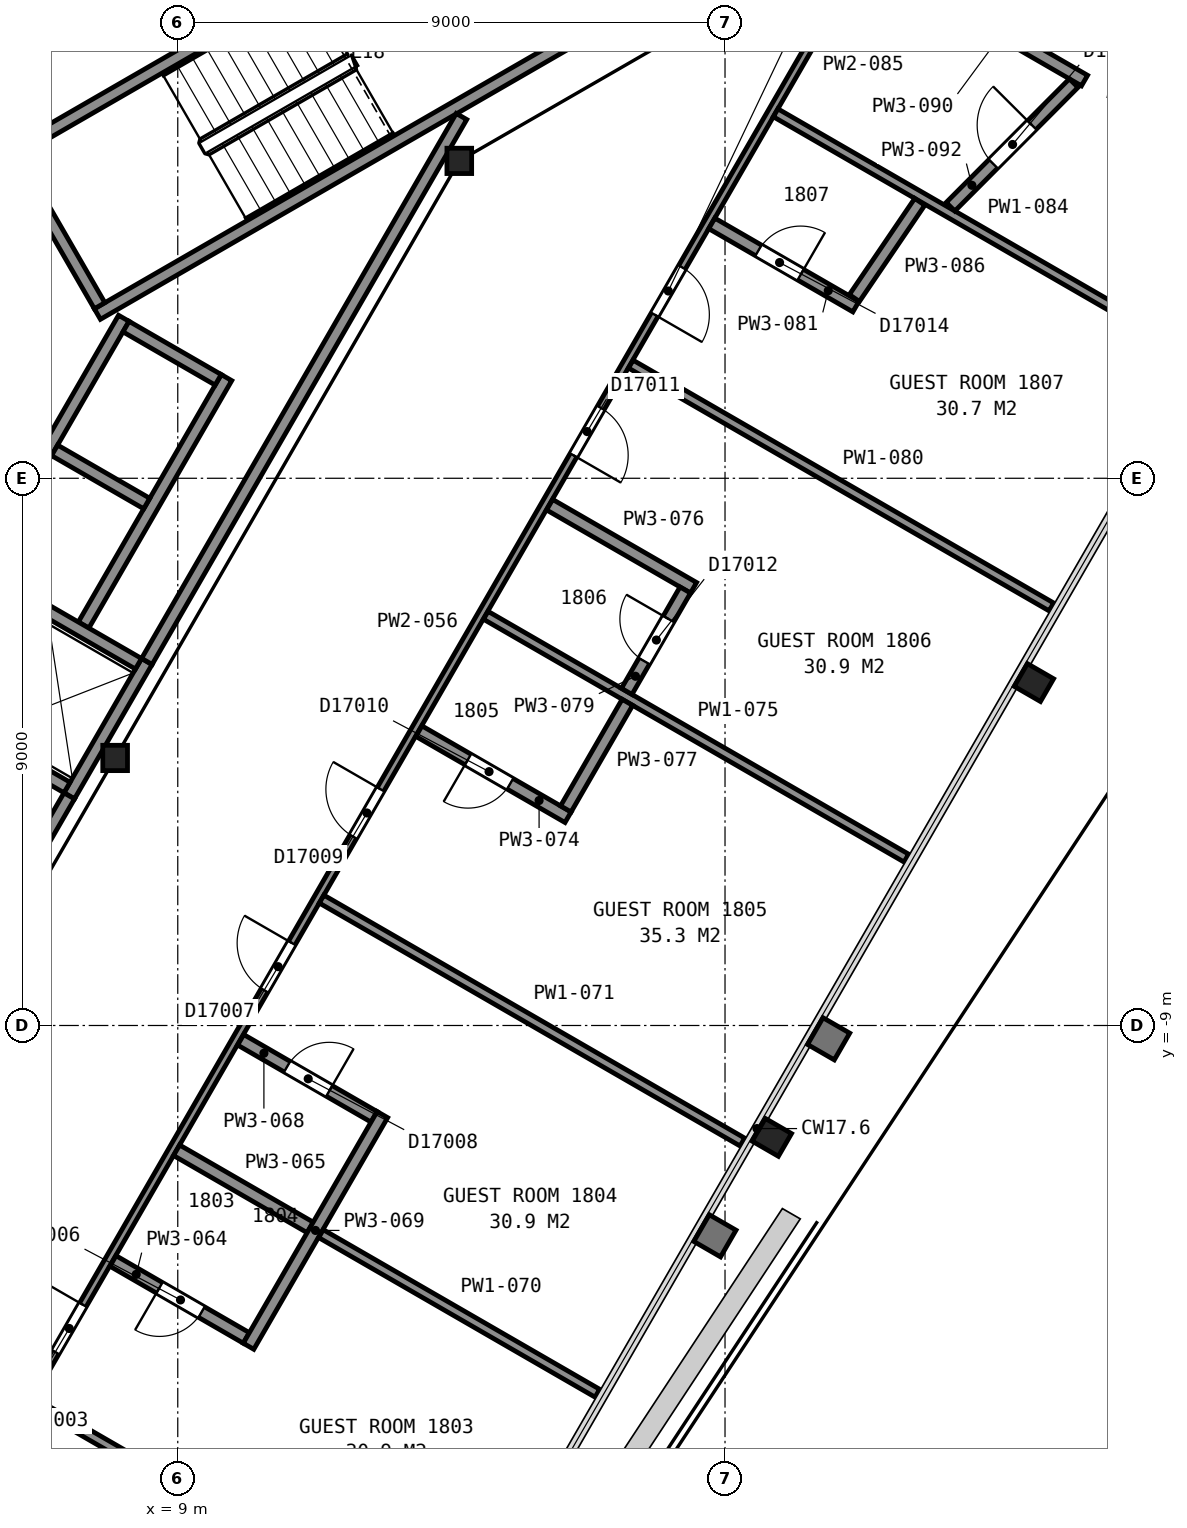
"""IFC4 building model, lengths in metres.
Left out: names, types, materials, properties, quantities, classifications, styles, units other than length and angle.
Written with IfcOpenShell. Run it as: python <this file> out.ifc"""

import sys

from ifc_helpers import new_model, si_unit, direction, frame, frame_2d, origin, origin_2d, place, context, subcontext, project, spatial, rectangle, i_section, extrude, element, fill, save


model = new_model("IFC4")
c1 = context("Model", 3, precision=1e-05, world=origin(), true_north=direction((0.0, 1.0)))
c2 = subcontext(c1, "Body", "Model", "MODEL_VIEW")
j1 = project(units=[si_unit("LENGTHUNIT", "METRE"), si_unit("PLANEANGLEUNIT", "RADIAN")], contexts=[c1])
p1 = place(None, origin())
s1 = spatial("IfcSite", under=j1, at=p1, CompositionType="ELEMENT")
p2 = place(p1, origin())
s2 = spatial("IfcBuilding", under=s1, at=p2, CompositionType="ELEMENT")
p3 = place(p2, frame((0.0, 0.0, 80.0)))
s3 = spatial("IfcBuildingStorey", under=s2, at=p3, CompositionType="ELEMENT", Elevation=80.0)
for number, where, z_axis, x_axis in (
    (1, (18.77, -10.84, 0.0), (0.0, 0.0, 1.0), (-0.5, -0.866, 0.0)),
    (2, (23.08, -3.36, 0.0), (0.0, 0.0, 1.0), (-0.5, -0.866, 0.0)),
):
    element("IfcColumn", number, at=place(p3, frame(where, z_axis=z_axis, x_axis=x_axis)), inside=s3, PredefinedType="COLUMN", context=c2, shape_type="SweptSolid", body=[
        extrude(i_section(OverallWidth=0.432, OverallDepth=0.498, WebThickness=0.056, FlangeThickness=0.089, FilletRadius=0.015, at=origin_2d()), origin(), (0.0, 0.0, 1.0), 3.6),
    ])
for number, where, z_axis, x_axis in (
    (3, (13.63, 5.22, 0.0), (0.0, 0.0, 1.0), (1.0, 0.0, 0.0)),
    (4, (7.97, -4.6, 0.0), (0.0, 0.0, 1.0), (1.0, 0.0, 0.0)),
):
    element("IfcColumn", number, at=place(p3, frame(where, z_axis=z_axis, x_axis=x_axis)), inside=s3, PredefinedType="COLUMN", context=c2, shape_type="SweptSolid", body=[
        extrude(i_section(OverallWidth=0.406, OverallDepth=0.417, WebThickness=0.03, FlangeThickness=0.048, FilletRadius=0.015, at=origin_2d()), origin(), (0.0, 0.0, 1.0), 3.6),
    ])
for number, where, z_axis, x_axis in (
    (5, (6.178, 5.299, 0.0), (0.0, 0.0, 1.0), (0.866, 0.5, 0.0)),
    (6, (7.678, 2.701, 0.0), (0.0, 0.0, 1.0), (0.866, 0.5, 0.0)),
):
    element("IfcWall", number, at=place(p3, frame(where, z_axis=z_axis, x_axis=x_axis)), inside=s3, PredefinedType="PARTITIONING", context=c2, shape_type="SweptSolid", body=[
        extrude(rectangle(XDim=12.0, YDim=0.2, at=frame_2d((6.0, 0.0))), origin(), (0.0, 0.0, 1.0), 3.35),
    ])
p4 = place(p3, frame((7.715, 2.838, 0.0), z_axis=(0.0, 0.0, 1.0), x_axis=(-0.500049511043, 0.865996816683, 0.0)))
e7 = element("IfcWall", 7, at=p4, inside=s3, PredefinedType="PARTITIONING", context=c2, shape_type="SweptSolid", body=[
    extrude(rectangle(XDim=2.8, YDim=0.2, at=frame_2d((1.4, 0.0))), origin(), (0.0, 0.0, 1.0), 3.35),
])
p5 = place(p3, frame((7.216, -5.222, 0.0), z_axis=(0.0, 0.0, 1.0), x_axis=(0.499990435942, 0.866030925526, 0.0)))
e8 = element("IfcWall", 8, at=p5, inside=s3, PredefinedType="PARTITIONING", context=c2, shape_type="SweptSolid", body=[
    extrude(rectangle(XDim=2.55, YDim=0.2, at=frame_2d((1.275, 0.0))), origin(), (0.0, 0.0, 1.0), 3.6),
])
p6 = place(p3, frame((7.451, -2.414, 0.0), z_axis=(0.0, 0.0, 1.0), x_axis=(0.500016218704, 0.866016039709, 0.0)))
e9 = element("IfcWall", 9, at=p6, inside=s3, PredefinedType="PARTITIONING", context=c2, shape_type="SweptSolid", body=[
    extrude(rectangle(XDim=4.7, YDim=0.2, at=frame_2d((2.35, 0.0))), origin(), (0.0, 0.0, 1.0), 3.6),
])
p7 = place(p3, frame((5.663, -1.612, 0.0), z_axis=(0.0, 0.0, 1.0), x_axis=(0.49998122708, 0.866036242063, 0.0)))
e10 = element("IfcWall", 10, at=p7, inside=s3, PredefinedType="PARTITIONING", context=c2, shape_type="SweptSolid", body=[
    extrude(rectangle(XDim=4.9, YDim=0.2, at=frame_2d((2.45, 0.0))), origin(), (0.0, 0.0, 1.0), 3.6),
])
p8 = place(p3, frame((9.665, 1.62, 0.0), z_axis=(0.0, 0.0, 1.0), x_axis=(-0.866002029911, 0.500040482552, 0.0)))
e11 = element("IfcWall", 11, at=p8, inside=s3, PredefinedType="PARTITIONING", context=c2, shape_type="SweptSolid", body=[
    extrude(rectangle(XDim=1.75, YDim=0.2, at=frame_2d((0.875, 0.0))), origin(), (0.0, 0.0, 1.0), 3.6),
])
p9 = place(p3, frame((8.49, -0.416, 0.0), z_axis=(0.0, 0.0, 1.0), x_axis=(-0.866036909293, 0.499980071345, 0.0)))
e12 = element("IfcWall", 12, at=p9, inside=s3, PredefinedType="PARTITIONING", context=c2, shape_type="SweptSolid", body=[
    extrude(rectangle(XDim=1.75, YDim=0.2, at=frame_2d((0.875, 0.0))), origin(), (0.0, 0.0, 1.0), 3.6),
])
p10 = place(p3, frame((8.354, -3.051, 0.0), z_axis=(0.0, 0.0, 1.0), x_axis=(-0.866060182126, 0.499939757307, 0.0)))
e13 = element("IfcWall", 13, at=p10, inside=s3, PredefinedType="PARTITIONING", context=c2, shape_type="SweptSolid", body=[
    extrude(rectangle(XDim=2.95, YDim=0.2, at=frame_2d((1.475, 0.0))), origin(), (0.0, 0.0, 1.0), 3.6),
])
p11 = place(p3, frame((7.179, -5.086, 0.0), z_axis=(0.0, 0.0, 1.0), x_axis=(-0.866036909293, 0.499980071345, 0.0)))
e14 = element("IfcWall", 14, at=p11, inside=s3, PredefinedType="PARTITIONING", context=c2, shape_type="SweptSolid", body=[
    extrude(rectangle(XDim=1.75, YDim=0.2, at=frame_2d((0.875, 0.0))), origin(), (0.0, 0.0, 1.0), 3.6),
])
p12 = place(p3, frame((5.906, -7.49, 0.0), z_axis=(0.0, 0.0, 1.0), x_axis=(0.500252727967, 0.865879442048, 0.0)))
e15 = element("IfcWall", 15, at=p12, inside=s3, PredefinedType="PARTITIONING", context=c2, shape_type="SweptSolid", body=[
    extrude(rectangle(XDim=2.617, YDim=0.2, at=frame_2d((1.309, 0.0))), origin(), (0.0, 0.0, 1.0), 3.35),
])
p13 = place(p3, frame((8.492, -3.012, 0.0), z_axis=(0.0, 0.0, 1.0), x_axis=(0.499972957231, 0.866041016371, 0.0)))
e16 = element("IfcWall", 16, at=p13, inside=s3, PredefinedType="PARTITIONING", context=c2, shape_type="SweptSolid", body=[
    extrude(rectangle(XDim=10.349, YDim=0.2, at=frame_2d((5.174, 0.0))), origin(), (0.0, 0.0, 1.0), 3.35),
])
p14 = place(p3, frame((19.456, 7.217, 0.0), z_axis=(0.0, 0.0, 1.0), x_axis=(-0.50002170027, -0.866012874765, 0.0)))
e17 = element("IfcWall", 17, at=p14, inside=s3, PredefinedType="PARTITIONING", context=c2, shape_type="SweptSolid", body=[
    extrude(rectangle(XDim=31.379, YDim=0.125, at=frame_2d((15.69, 0.0))), origin(), (0.0, 0.0, 1.0), 2.613),
])
p15 = place(p14, frame((26.843, 0.0, 0.0)))
e18 = element("IfcOpeningElement", 18, at=p15, cuts=e17, PredefinedType="OPENING", context=c2, shape_type="SweptSolid", body=[
    extrude(rectangle(XDim=1.0, YDim=2.1, at=frame_2d((0.5, 1.05))), frame((0.0, 0.073, 0.0), z_axis=(0.0, -1.0, 0.0), x_axis=(1.0, 0.0, 0.0)), (0.0, 0.0, 1.0), 0.145),
])
p16 = place(p14, frame((24.03, 0.0, 0.0)))
e19 = element("IfcOpeningElement", 19, at=p16, cuts=e17, PredefinedType="OPENING", context=c2, shape_type="SweptSolid", body=[
    extrude(rectangle(XDim=0.9, YDim=2.1, at=frame_2d((0.45, 1.05))), frame((0.0, 0.073, 0.0), z_axis=(0.0, -1.0, 0.0), x_axis=(1.0, 0.0, 0.0)), (0.0, 0.0, 1.0), 0.145),
])
p17 = place(p14, frame((17.159, 0.0, 0.0)))
e20 = element("IfcOpeningElement", 20, at=p17, cuts=e17, PredefinedType="OPENING", context=c2, shape_type="SweptSolid", body=[
    extrude(rectangle(XDim=0.9, YDim=2.1, at=frame_2d((0.45, 1.05))), frame((0.0, 0.073, 0.0), z_axis=(0.0, -1.0, 0.0), x_axis=(1.0, 0.0, 0.0)), (0.0, 0.0, 1.0), 0.145),
])
p18 = place(p14, frame((14.24, 0.0, 0.0)))
e21 = element("IfcOpeningElement", 21, at=p18, cuts=e17, PredefinedType="OPENING", context=c2, shape_type="SweptSolid", body=[
    extrude(rectangle(XDim=0.9, YDim=2.1, at=frame_2d((0.45, 1.05))), frame((0.0, 0.073, 0.0), z_axis=(0.0, -1.0, 0.0), x_axis=(1.0, 0.0, 0.0)), (0.0, 0.0, 1.0), 0.145),
])
p19 = place(p14, frame((6.997, 0.0, 0.0)))
e22 = element("IfcOpeningElement", 22, at=p19, cuts=e17, PredefinedType="OPENING", context=c2, shape_type="SweptSolid", body=[
    extrude(rectangle(XDim=0.9, YDim=2.1, at=frame_2d((0.45, 1.05))), frame((0.0, 0.073, 0.0), z_axis=(0.0, -1.0, 0.0), x_axis=(1.0, 0.0, 0.0)), (0.0, 0.0, 1.0), 0.145),
])
p20 = place(p14, frame((4.327, 0.0, 0.0)))
e23 = element("IfcOpeningElement", 23, at=p20, cuts=e17, PredefinedType="OPENING", context=c2, shape_type="SweptSolid", body=[
    extrude(rectangle(XDim=0.9, YDim=2.1, at=frame_2d((0.45, 1.05))), frame((0.0, 0.073, 0.0), z_axis=(0.0, -1.0, 0.0), x_axis=(1.0, 0.0, 0.0)), (0.0, 0.0, 1.0), 0.145),
])
p21 = place(p3, frame((6.595, -15.183, 0.0), z_axis=(0.0, 0.0, 1.0), x_axis=(0.866014133745, -0.500019519773, 0.0)))
e24 = element("IfcWall", 24, at=p21, inside=s3, PredefinedType="PARTITIONING", context=c2, shape_type="SweptSolid", body=[
    extrude(rectangle(XDim=7.991, YDim=0.15, at=frame_2d((3.996, 0.0))), origin(), (0.0, 0.0, 1.0), 2.613),
])
p22 = place(p3, frame((7.935, -12.873, 0.0), z_axis=(0.0, 0.0, 1.0), x_axis=(0.866015388607, -0.500017346395, 0.0)))
e25 = element("IfcWall", 25, at=p22, inside=s3, PredefinedType="PARTITIONING", context=c2, shape_type="SweptSolid", body=[
    extrude(rectangle(XDim=2.532, YDim=0.2, at=frame_2d((1.266, 0.0))), origin(), (0.0, 0.0, 1.0), 2.613),
])
p23 = place(p22, frame((0.883, 0.0, 0.0)))
e26 = element("IfcOpeningElement", 26, at=p23, cuts=e25, PredefinedType="OPENING", context=c2, shape_type="SweptSolid", body=[
    extrude(rectangle(XDim=0.8, YDim=2.1, at=frame_2d((0.4, 1.05))), frame((0.0, 0.11, 0.0), z_axis=(0.0, -1.0, 0.0), x_axis=(1.0, 0.0, 0.0)), (0.0, 0.0, 1.0), 0.22),
])
p24 = place(p3, frame((8.98, -11.052, 0.0), z_axis=(0.0, 0.0, 1.0), x_axis=(0.865990087344, -0.500061164881, 0.0)))
e27 = element("IfcWall", 27, at=p24, inside=s3, PredefinedType="PARTITIONING", context=c2, shape_type="SweptSolid", body=[
    extrude(rectangle(XDim=2.537, YDim=0.2, at=frame_2d((1.269, 0.0))), origin(), (0.0, 0.0, 1.0), 2.613),
])
p25 = place(p3, frame((12.228, -10.502, 0.0), z_axis=(0.0, 0.0, 1.0), x_axis=(-0.866111763775, 0.499850390267, 0.0)))
e28 = element("IfcWall", 28, at=p25, inside=s3, PredefinedType="PARTITIONING", context=c2, shape_type="SweptSolid", body=[
    extrude(rectangle(XDim=2.533, YDim=0.2, at=frame_2d((1.267, 0.0))), origin(), (0.0, 0.0, 1.0), 2.613),
])
p26 = place(p25, frame((0.851, 0.0, 0.0)))
e29 = element("IfcOpeningElement", 29, at=p26, cuts=e28, PredefinedType="OPENING", context=c2, shape_type="SweptSolid", body=[
    extrude(rectangle(XDim=0.8, YDim=2.1, at=frame_2d((0.4, 1.05))), frame((0.0, 0.11, 0.0), z_axis=(0.0, -1.0, 0.0), x_axis=(1.0, 0.0, 0.0)), (0.0, 0.0, 1.0), 0.22),
])
p27 = place(p3, frame((10.164, -14.276, 0.0), z_axis=(0.0, 0.0, 1.0), x_axis=(0.50017868667, 0.865922214405, 0.0)))
e30 = element("IfcWall", 30, at=p27, inside=s3, PredefinedType="PARTITIONING", context=c2, shape_type="SweptSolid", body=[
    extrude(rectangle(XDim=4.4, YDim=0.2, at=frame_2d((2.2, 0.0))), origin(), (0.0, 0.0, 1.0), 2.613),
])
p28 = place(p3, frame((11.355, -12.424, 0.0), z_axis=(0.0, 0.0, 1.0), x_axis=(0.866030680601, -0.499990860175, 0.0)))
e31 = element("IfcWall", 31, at=p28, inside=s3, PredefinedType="PARTITIONING", context=c2, shape_type="SweptSolid", body=[
    extrude(rectangle(XDim=5.249, YDim=0.15, at=frame_2d((2.625, 0.0))), origin(), (0.0, 0.0, 1.0), 2.613),
])
p29 = place(p3, frame((11.365, -6.921, 0.0), z_axis=(0.0, 0.0, 1.0), x_axis=(0.866008543052, -0.500029202507, 0.0)))
e32 = element("IfcWall", 32, at=p29, inside=s3, PredefinedType="PARTITIONING", context=c2, shape_type="SweptSolid", body=[
    extrude(rectangle(XDim=7.992, YDim=0.15, at=frame_2d((3.996, 0.0))), origin(), (0.0, 0.0, 1.0), 2.613),
])
p30 = place(p3, frame((12.966, -4.159, 0.0), z_axis=(0.0, 0.0, 1.0), x_axis=(0.866033446572, -0.499986069224, 0.0)))
e33 = element("IfcWall", 33, at=p30, inside=s3, PredefinedType="PARTITIONING", context=c2, shape_type="SweptSolid", body=[
    extrude(rectangle(XDim=2.833, YDim=0.2, at=frame_2d((1.416, 0.0))), origin(), (0.0, 0.0, 1.0), 2.613),
])
p31 = place(p30, frame((0.933, 0.0, 0.0)))
e34 = element("IfcOpeningElement", 34, at=p31, cuts=e33, PredefinedType="OPENING", context=c2, shape_type="SweptSolid", body=[
    extrude(rectangle(XDim=0.8, YDim=2.1, at=frame_2d((0.4, 1.05))), frame((0.0, 0.11, 0.0), z_axis=(0.0, -1.0, 0.0), x_axis=(1.0, 0.0, 0.0)), (0.0, 0.0, 1.0), 0.22),
])
p32 = place(p3, frame((14.065, -2.254, 0.0), z_axis=(0.0, 0.0, 1.0), x_axis=(0.866045096311, -0.499965889992, 0.0)))
e35 = element("IfcWall", 35, at=p32, inside=s3, PredefinedType="PARTITIONING", context=c2, shape_type="SweptSolid", body=[
    extrude(rectangle(XDim=7.987, YDim=0.15, at=frame_2d((3.993, 0.0))), origin(), (0.0, 0.0, 1.0), 2.613),
])
p33 = place(p3, frame((15.115, -0.435, 0.0), z_axis=(0.0, 0.0, 1.0), x_axis=(0.866102295869, -0.499866795347, 0.0)))
e36 = element("IfcWall", 36, at=p33, inside=s3, PredefinedType="PARTITIONING", context=c2, shape_type="SweptSolid", body=[
    extrude(rectangle(XDim=2.733, YDim=0.2, at=frame_2d((1.367, 0.0))), origin(), (0.0, 0.0, 1.0), 2.613),
])
p34 = place(p3, frame((15.382, -5.438, 0.0), z_axis=(0.0, 0.0, 1.0), x_axis=(0.500042536776, 0.866000843773, 0.0)))
e37 = element("IfcWall", 37, at=p34, inside=s3, PredefinedType="PARTITIONING", context=c2, shape_type="SweptSolid", body=[
    extrude(rectangle(XDim=2.025, YDim=0.2, at=frame_2d((1.012, 0.0))), origin(), (0.0, 0.0, 1.0), 2.613),
])
p35 = place(p3, frame((16.384, -3.505, 0.0), z_axis=(0.0, 0.0, 1.0), x_axis=(0.499876134923, 0.86609690551, 0.0)))
e38 = element("IfcWall", 38, at=p35, inside=s3, PredefinedType="PARTITIONING", context=c2, shape_type="SweptSolid", body=[
    extrude(rectangle(XDim=1.925, YDim=0.2, at=frame_2d((0.963, 0.0))), origin(), (0.0, 0.0, 1.0), 2.613),
])
p36 = place(p35, frame((0.575, 0.0, 0.0)))
e39 = element("IfcOpeningElement", 39, at=p36, cuts=e38, PredefinedType="OPENING", context=c2, shape_type="SweptSolid", body=[
    extrude(rectangle(XDim=0.8, YDim=2.1, at=frame_2d((0.4, 1.05))), frame((0.0, 0.11, 0.0), z_axis=(0.0, -1.0, 0.0), x_axis=(1.0, 0.0, 0.0)), (0.0, 0.0, 1.0), 0.22),
])
p37 = place(p3, frame((16.45, 1.877, 0.0), z_axis=(0.0, 0.0, 1.0), x_axis=(0.866052736899, -0.499952654668, 0.0)))
e40 = element("IfcWall", 40, at=p37, inside=s3, PredefinedType="PARTITIONING", context=c2, shape_type="SweptSolid", body=[
    extrude(rectangle(XDim=7.987, YDim=0.15, at=frame_2d((3.994, 0.0))), origin(), (0.0, 0.0, 1.0), 2.613),
])
p38 = place(p3, frame((17.782, 4.192, 0.0), z_axis=(0.0, 0.0, 1.0), x_axis=(0.866005850709, -0.50003386539, 0.0)))
e41 = element("IfcWall", 41, at=p38, inside=s3, PredefinedType="PARTITIONING", context=c2, shape_type="SweptSolid", body=[
    extrude(rectangle(XDim=2.737, YDim=0.2, at=frame_2d((1.369, 0.0))), origin(), (0.0, 0.0, 1.0), 2.613),
])
p39 = place(p38, frame((0.887, 0.0, 0.0)))
e42 = element("IfcOpeningElement", 42, at=p39, cuts=e41, PredefinedType="OPENING", context=c2, shape_type="SweptSolid", body=[
    extrude(rectangle(XDim=0.8, YDim=2.1, at=frame_2d((0.4, 1.05))), frame((0.0, 0.11, 0.0), z_axis=(0.0, -1.0, 0.0), x_axis=(1.0, 0.0, 0.0)), (0.0, 0.0, 1.0), 0.22),
])
p40 = place(p3, frame((18.832, 6.011, 0.0), z_axis=(0.0, 0.0, 1.0), x_axis=(0.866027362729, -0.499996606993, 0.0)))
e43 = element("IfcWall", 43, at=p40, inside=s3, PredefinedType="PARTITIONING", context=c2, shape_type="SweptSolid", body=[
    extrude(rectangle(XDim=7.991, YDim=0.15, at=frame_2d((3.996, 0.0))), origin(), (0.0, 0.0, 1.0), 2.613),
])
p41 = place(p3, frame((20.128, 2.964, 0.0), z_axis=(0.0, 0.0, 1.0), x_axis=(0.561894569182, 0.827208857015, 0.0)))
e44 = element("IfcWall", 44, at=p41, inside=s3, PredefinedType="PARTITIONING", context=c2, shape_type="SweptSolid", body=[
    extrude(rectangle(XDim=1.913, YDim=0.2, at=frame_2d((0.957, 0.0))), origin(), (0.0, 0.0, 1.0), 2.613),
])
p42 = place(p3, frame((21.209, 8.102, 0.0), z_axis=(0.0, 0.0, 1.0), x_axis=(0.86597196262, -0.50009255139, 0.0)))
e45 = element("IfcWall", 45, at=p42, inside=s3, PredefinedType="PARTITIONING", context=c2, shape_type="SweptSolid", body=[
    extrude(rectangle(XDim=3.122, YDim=0.2, at=frame_2d((1.561, 0.0))), origin(), (0.0, 0.0, 1.0), 2.613),
])
p43 = place(p3, frame((21.708, 4.466, 0.0), z_axis=(0.0, 0.0, 1.0), x_axis=(0.70578703929, 0.708424064506, 0.0)))
e46 = element("IfcWall", 46, at=p43, inside=s3, PredefinedType="PARTITIONING", context=c2, shape_type="SweptSolid", body=[
    extrude(rectangle(XDim=2.87, YDim=0.2, at=frame_2d((1.435, 0.0))), origin(), (0.0, 0.0, 1.0), 2.613),
])
p44 = place(p43, frame((0.996, 0.0, 0.0)))
e47 = element("IfcOpeningElement", 47, at=p44, cuts=e46, PredefinedType="OPENING", context=c2, shape_type="SweptSolid", body=[
    extrude(rectangle(XDim=0.9, YDim=2.1, at=frame_2d((0.45, 1.05))), frame((0.0, 0.11, 0.0), z_axis=(0.0, -1.0, 0.0), x_axis=(1.0, 0.0, 0.0)), (0.0, 0.0, 1.0), 0.22),
])
p45 = place(p16, origin())
e48 = element("IfcDoor", 48, at=p45, inside=s3, OperationType="SINGLE_SWING_LEFT", PredefinedType="DOOR", context=c2, shape_type="SweptSolid", body=[
    extrude(rectangle(XDim=0.9, YDim=2.1, at=frame_2d((0.45, 1.05))), frame((0.0, 0.025, 0.0), z_axis=(0.0, -1.0, 0.0), x_axis=(1.0, 0.0, 0.0)), (0.0, 0.0, 1.0), 0.05),
])
fill(e19, e48)
p46 = place(p17, origin())
e49 = element("IfcDoor", 49, at=p46, inside=s3, OperationType="SINGLE_SWING_LEFT", PredefinedType="DOOR", context=c2, shape_type="SweptSolid", body=[
    extrude(rectangle(XDim=0.9, YDim=2.1, at=frame_2d((0.45, 1.05))), frame((0.0, 0.025, 0.0), z_axis=(0.0, -1.0, 0.0), x_axis=(1.0, 0.0, 0.0)), (0.0, 0.0, 1.0), 0.05),
])
fill(e20, e49)
p47 = place(p18, origin())
e50 = element("IfcDoor", 50, at=p47, inside=s3, OperationType="SINGLE_SWING_LEFT", PredefinedType="DOOR", context=c2, shape_type="SweptSolid", body=[
    extrude(rectangle(XDim=0.9, YDim=2.1, at=frame_2d((0.45, 1.05))), frame((0.0, 0.025, 0.0), z_axis=(0.0, -1.0, 0.0), x_axis=(1.0, 0.0, 0.0)), (0.0, 0.0, 1.0), 0.05),
])
fill(e21, e50)
p48 = place(p19, origin())
e51 = element("IfcDoor", 51, at=p48, inside=s3, OperationType="SINGLE_SWING_RIGHT", PredefinedType="DOOR", context=c2, shape_type="SweptSolid", body=[
    extrude(rectangle(XDim=0.9, YDim=2.1, at=frame_2d((0.45, 1.05))), frame((0.0, 0.025, 0.0), z_axis=(0.0, -1.0, 0.0), x_axis=(1.0, 0.0, 0.0)), (0.0, 0.0, 1.0), 0.05),
])
fill(e22, e51)
p49 = place(p20, origin())
e52 = element("IfcDoor", 52, at=p49, inside=s3, OperationType="SINGLE_SWING_RIGHT", PredefinedType="DOOR", context=c2, shape_type="SweptSolid", body=[
    extrude(rectangle(XDim=0.9, YDim=2.1, at=frame_2d((0.45, 1.05))), frame((0.0, 0.025, 0.0), z_axis=(0.0, -1.0, 0.0), x_axis=(1.0, 0.0, 0.0)), (0.0, 0.0, 1.0), 0.05),
])
fill(e23, e52)
p50 = place(p23, origin())
e53 = element("IfcDoor", 53, at=p50, inside=s3, OperationType="SINGLE_SWING_LEFT", PredefinedType="DOOR", context=c2, shape_type="SweptSolid", body=[
    extrude(rectangle(XDim=0.8, YDim=2.1, at=frame_2d((0.4, 1.05))), frame((0.0, 0.025, 0.0), z_axis=(0.0, -1.0, 0.0), x_axis=(1.0, 0.0, 0.0)), (0.0, 0.0, 1.0), 0.05),
])
fill(e26, e53)
p51 = place(p26, origin())
e54 = element("IfcDoor", 54, at=p51, inside=s3, OperationType="SINGLE_SWING_LEFT", PredefinedType="DOOR", context=c2, shape_type="SweptSolid", body=[
    extrude(rectangle(XDim=0.8, YDim=2.1, at=frame_2d((0.4, 1.05))), frame((0.0, 0.025, 0.0), z_axis=(0.0, -1.0, 0.0), x_axis=(1.0, 0.0, 0.0)), (0.0, 0.0, 1.0), 0.05),
])
fill(e29, e54)
p52 = place(p31, origin())
e55 = element("IfcDoor", 55, at=p52, inside=s3, OperationType="SINGLE_SWING_LEFT", PredefinedType="DOOR", context=c2, shape_type="SweptSolid", body=[
    extrude(rectangle(XDim=0.8, YDim=2.1, at=frame_2d((0.4, 1.05))), frame((0.0, 0.025, 0.0), z_axis=(0.0, -1.0, 0.0), x_axis=(1.0, 0.0, 0.0)), (0.0, 0.0, 1.0), 0.05),
])
fill(e34, e55)
p53 = place(p36, origin())
e56 = element("IfcDoor", 56, at=p53, inside=s3, OperationType="SINGLE_SWING_RIGHT", PredefinedType="DOOR", context=c2, shape_type="SweptSolid", body=[
    extrude(rectangle(XDim=0.8, YDim=2.1, at=frame_2d((0.4, 1.05))), frame((0.0, 0.025, 0.0), z_axis=(0.0, -1.0, 0.0), x_axis=(1.0, 0.0, 0.0)), (0.0, 0.0, 1.0), 0.05),
])
fill(e39, e56)
p54 = place(p39, origin())
e57 = element("IfcDoor", 57, at=p54, inside=s3, OperationType="SINGLE_SWING_RIGHT", PredefinedType="DOOR", context=c2, shape_type="SweptSolid", body=[
    extrude(rectangle(XDim=0.8, YDim=2.1, at=frame_2d((0.4, 1.05))), frame((0.0, 0.025, 0.0), z_axis=(0.0, -1.0, 0.0), x_axis=(1.0, 0.0, 0.0)), (0.0, 0.0, 1.0), 0.05),
])
fill(e42, e57)
p55 = place(p44, origin())
e58 = element("IfcDoor", 58, at=p55, inside=s3, OperationType="SINGLE_SWING_RIGHT", PredefinedType="DOOR", context=c2, shape_type="SweptSolid", body=[
    extrude(rectangle(XDim=0.9, YDim=2.1, at=frame_2d((0.45, 1.05))), frame((0.0, 0.025, 0.0), z_axis=(0.0, -1.0, 0.0), x_axis=(1.0, 0.0, 0.0)), (0.0, 0.0, 1.0), 0.05),
])
fill(e47, e58)
save(model, sys.argv[1])
